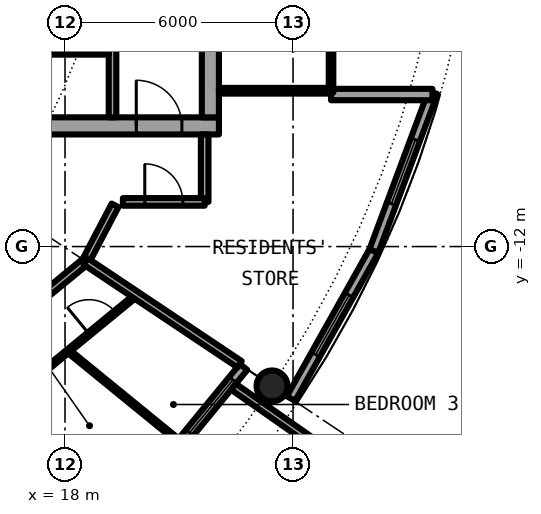
"""IFC4 building model, lengths in metres.
Left out: names, types, materials, properties, quantities, classifications, styles, units other than length and angle.
Written with IfcOpenShell. Run it as: python <this file> out.ifc"""

import sys

from ifc_helpers import new_model, si_unit, direction, frame, frame_2d, origin, origin_2d, place, context, subcontext, project, spatial, rectangle, hollow_circle, extrude, element, fill, save


model = new_model("IFC4")
c1 = context("Model", 3, precision=1e-05, world=origin(), true_north=direction((0.0, 1.0)))
c2 = subcontext(c1, "Body", "Model", "MODEL_VIEW")
j1 = project(units=[si_unit("LENGTHUNIT", "METRE"), si_unit("PLANEANGLEUNIT", "RADIAN")], contexts=[c1])
p1 = place(None, origin())
s1 = spatial("IfcSite", under=j1, at=p1, CompositionType="ELEMENT")
p2 = place(p1, origin())
s2 = spatial("IfcBuilding", under=s1, at=p2, CompositionType="ELEMENT")
p3 = place(p2, frame((0.0, 0.0, 196.3)))
s3 = spatial("IfcBuildingStorey", under=s2, at=p3, CompositionType="ELEMENT", Elevation=196.3)
p4 = place(p3, frame((23.448, -15.667, 0.0), z_axis=(0.0, 0.0, 1.0), x_axis=(1.0, 0.0, 0.0)))
e1 = element("IfcColumn", 1, at=p4, inside=s3, PredefinedType="COLUMN", context=c2, shape_type="SweptSolid", body=[
    extrude(hollow_circle(Radius=0.406, WallThickness=0.03, at=origin_2d()), origin(), (0.0, 0.0, 1.0), 3.05),
])
p5 = place(p3, frame((19.304, -19.304, 0.0), z_axis=(0.0, 0.0, 1.0), x_axis=(0.634382322723, 0.773019449054, 0.0)))
e2 = element("IfcWall", 2, at=p5, inside=s3, PredefinedType="SOLIDWALL", context=c2, shape_type="SweptSolid", body=[
    extrude(rectangle(XDim=5.352, YDim=0.25, at=frame_2d((2.676, 0.0))), origin(), (0.0, 0.0, 1.0), 2.7),
])
p6 = place(p5, frame((0.841, 0.0, 0.0)))
e3 = element("IfcOpeningElement", 3, at=p6, cuts=e2, PredefinedType="OPENING", context=c2, shape_type="SweptSolid", body=[
    extrude(rectangle(XDim=1.0, YDim=2.2, at=frame_2d((0.5, 1.1))), frame((0.0, 0.135, 0.0), z_axis=(0.0, -1.0, 0.0), x_axis=(1.0, 0.0, 0.0)), (0.0, 0.0, 1.0), 0.27),
])
p7 = place(p5, frame((3.111, 0.0, 0.3)))
e4 = element("IfcOpeningElement", 4, at=p7, cuts=e2, PredefinedType="OPENING", context=c2, shape_type="SweptSolid", body=[
    extrude(rectangle(XDim=1.8, YDim=2.1, at=frame_2d((0.9, 1.05))), frame((0.0, 0.135, 0.0), z_axis=(0.0, -1.0, 0.0), x_axis=(1.0, 0.0, 0.0)), (0.0, 0.0, 1.0), 0.27),
])
p8 = place(p3, frame((22.433, -15.688, -0.03), z_axis=(0.0, 0.0, 1.0), x_axis=(0.819373043115, -0.573260687834, 0.0)))
e5 = element("IfcWall", 5, at=p8, inside=s3, PredefinedType="SOLIDWALL", context=c2, shape_type="SweptSolid", body=[
    extrude(rectangle(XDim=2.925, YDim=0.2, at=frame_2d((1.463, 0.0))), origin(), (0.0, 0.0, 1.0), 2.73),
])
p9 = place(p3, frame((23.946, -16.0, 0.0), z_axis=(0.0, 0.0, 1.0), x_axis=(0.489696356642, 0.871893042919, 0.0)))
e6 = element("IfcWall", 6, at=p9, inside=s3, PredefinedType="SOLIDWALL", context=c2, shape_type="SweptSolid", body=[
    extrude(rectangle(XDim=4.454, YDim=0.25, at=frame_2d((2.227, 0.0))), origin(), (0.0, 0.0, 1.0), 2.7),
])
p10 = place(p9, frame((1.327, 0.0, 0.3)))
e7 = element("IfcOpeningElement", 7, at=p10, cuts=e6, PredefinedType="OPENING", context=c2, shape_type="SweptSolid", body=[
    extrude(rectangle(XDim=1.8, YDim=2.1, at=frame_2d((0.9, 1.05))), frame((0.0, 0.135, 0.0), z_axis=(0.0, -1.0, 0.0), x_axis=(1.0, 0.0, 0.0)), (0.0, 0.0, 1.0), 0.27),
])
p11 = place(p3, frame((26.127, -12.117, 0.0), z_axis=(0.0, 0.0, 1.0), x_axis=(0.349247811493, 0.937030397675, 0.0)))
e8 = element("IfcWall", 8, at=p11, inside=s3, PredefinedType="SOLIDWALL", context=c2, shape_type="SweptSolid", body=[
    extrude(rectangle(XDim=4.452, YDim=0.25, at=frame_2d((2.226, 0.0))), origin(), (0.0, 0.0, 1.0), 2.7),
])
p12 = place(p11, frame((1.327, 0.0, 0.3)))
e9 = element("IfcOpeningElement", 9, at=p12, cuts=e8, PredefinedType="OPENING", context=c2, shape_type="SweptSolid", body=[
    extrude(rectangle(XDim=1.8, YDim=2.1, at=frame_2d((0.9, 1.05))), frame((0.0, 0.135, 0.0), z_axis=(0.0, -1.0, 0.0), x_axis=(1.0, 0.0, 0.0)), (0.0, 0.0, 1.0), 0.27),
])
p13 = place(p3, frame((25.0, -8.0, 0.0), z_axis=(0.0, 0.0, 1.0), x_axis=(1.0, 0.0, 0.0)))
e10 = element("IfcWall", 10, at=p13, inside=s3, PredefinedType="SOLIDWALL", context=c2, shape_type="SweptSolid", body=[
    extrude(rectangle(XDim=2.667, YDim=0.3, at=frame_2d((1.333, 0.0))), origin(), (0.0, 0.0, 1.0), 2.7),
])
p14 = place(p3, frame((8.55, -8.825, 0.0), z_axis=(0.0, 0.0, 1.0), x_axis=(1.0, 0.0, 0.0)))
e11 = element("IfcWall", 11, at=p14, inside=s3, PredefinedType="SHEAR", context=c2, shape_type="SweptSolid", body=[
    extrude(rectangle(XDim=13.5, YDim=0.45, at=frame_2d((6.75, 0.0))), origin(), (0.0, 0.0, 1.0), 3.05),
])
p15 = place(p14, frame((11.325, 0.0, 0.0)))
e12 = element("IfcOpeningElement", 12, at=p15, cuts=e11, PredefinedType="OPENING", context=c2, shape_type="SweptSolid", body=[
    extrude(rectangle(XDim=1.2, YDim=2.3, at=frame_2d((0.6, 1.15))), frame((0.0, 0.235, 0.0), z_axis=(0.0, -1.0, 0.0), x_axis=(1.0, 0.0, 0.0)), (0.0, 0.0, 1.0), 0.47),
])
p16 = place(p3, frame((21.825, 8.6, 0.0), z_axis=(0.0, 0.0, 1.0), x_axis=(0.0, -1.0, 0.0)))
e13 = element("IfcWall", 13, at=p16, inside=s3, PredefinedType="SHEAR", context=c2, shape_type="SweptSolid", body=[
    extrude(rectangle(XDim=17.2, YDim=0.45, at=frame_2d((8.6, 0.0))), origin(), (0.0, 0.0, 1.0), 3.05),
])
p17 = place(p16, frame((7.7, 0.0, 0.0)))
e14 = element("IfcOpeningElement", 14, at=p17, cuts=e13, PredefinedType="OPENING", context=c2, shape_type="SweptSolid", body=[
    extrude(rectangle(XDim=1.8, YDim=2.3, at=frame_2d((0.9, 1.15))), frame((0.0, 0.235, 0.0), z_axis=(0.0, -1.0, 0.0), x_axis=(1.0, 0.0, 0.0)), (0.0, 0.0, 1.0), 0.47),
])
p18 = place(p3, frame((19.25, -8.6, 0.0), z_axis=(0.0, 0.0, 1.0), x_axis=(0.0, 1.0, 0.0)))
e15 = element("IfcWall", 15, at=p18, inside=s3, PredefinedType="SOLIDWALL", context=c2, shape_type="SweptSolid", body=[
    extrude(rectangle(XDim=7.025, YDim=0.2, at=frame_2d((3.513, 0.0))), origin(), (0.0, 0.0, 1.0), 2.7),
])
p19 = place(p18, frame((2.35, 0.0, 0.0)))
e16 = element("IfcOpeningElement", 16, at=p19, cuts=e15, PredefinedType="OPENING", context=c2, shape_type="SweptSolid", body=[
    extrude(rectangle(XDim=1.1, YDim=2.3, at=frame_2d((0.55, 1.15))), frame((0.0, 0.11, 0.0), z_axis=(0.0, -1.0, 0.0), x_axis=(1.0, 0.0, 0.0)), (0.0, 0.0, 1.0), 0.22),
])
p20 = place(p3, frame((15.45, -6.875, 0.0), z_axis=(0.0, 0.0, 1.0), x_axis=(1.0, 0.0, 0.0)))
e17 = element("IfcWall", 17, at=p20, inside=s3, PredefinedType="PARTITIONING", context=c2, shape_type="SweptSolid", body=[
    extrude(rectangle(XDim=3.7, YDim=0.15, at=frame_2d((1.85, 0.0))), origin(), (0.0, 0.0, 1.0), 2.7),
])
p21 = place(p20, frame((1.4, 0.0, 0.0)))
e18 = element("IfcOpeningElement", 18, at=p21, cuts=e17, PredefinedType="OPENING", context=c2, shape_type="SweptSolid", body=[
    extrude(rectangle(XDim=0.9, YDim=2.3, at=frame_2d((0.45, 1.15))), frame((0.0, 0.085, 0.0), z_axis=(0.0, -1.0, 0.0), x_axis=(1.0, 0.0, 0.0)), (0.0, 0.0, 1.0), 0.17),
])
p22 = place(p3, frame((22.05, -7.9, 0.0), z_axis=(0.0, 0.0, 1.0), x_axis=(1.0, 0.0, 0.0)))
e19 = element("IfcWall", 19, at=p22, inside=s3, PredefinedType="PARTITIONING", context=c2, shape_type="SweptSolid", body=[
    extrude(rectangle(XDim=2.89, YDim=0.15, at=frame_2d((1.445, 0.0))), origin(), (0.0, 0.0, 1.0), 2.7),
])
p23 = place(p3, frame((25.0, -7.95, 0.0), z_axis=(0.0, 0.0, 1.0), x_axis=(0.0, 1.0, 0.0)))
e20 = element("IfcWall", 20, at=p23, inside=s3, PredefinedType="PARTITIONING", context=c2, shape_type="SweptSolid", body=[
    extrude(rectangle(XDim=15.9, YDim=0.12, at=frame_2d((7.95, 0.0))), origin(), (0.0, 0.0, 1.0), 2.7),
])
p24 = place(p23, frame((0.95, 0.0, 0.1)))
e21 = element("IfcOpeningElement", 21, at=p24, cuts=e20, PredefinedType="OPENING", context=c2, shape_type="SweptSolid", body=[
    extrude(rectangle(XDim=14.0, YDim=2.35, at=frame_2d((7.0, 1.175))), frame((0.0, 0.07, 0.0), z_axis=(0.0, -1.0, 0.0), x_axis=(1.0, 0.0, 0.0)), (0.0, 0.0, 1.0), 0.14),
])
p25 = place(p3, frame((14.508, -17.681, 0.0), z_axis=(0.0, 0.0, 1.0), x_axis=(0.773155647559, 0.634216323227, 0.0)))
e22 = element("IfcWall", 22, at=p25, inside=s3, PredefinedType="PARTITIONING", context=c2, shape_type="SweptSolid", body=[
    extrude(rectangle(XDim=6.939, YDim=0.1, at=frame_2d((3.469, 0.0))), origin(), (0.0, 0.0, 1.0), 2.7),
])
p26 = place(p25, frame((3.019, 0.0, 0.0)))
e23 = element("IfcOpeningElement", 23, at=p26, cuts=e22, PredefinedType="OPENING", context=c2, shape_type="SweptSolid", body=[
    extrude(rectangle(XDim=0.9, YDim=2.3, at=frame_2d((0.45, 1.15))), frame((0.0, 0.06, 0.0), z_axis=(0.0, -1.0, 0.0), x_axis=(1.0, 0.0, 0.0)), (0.0, 0.0, 1.0), 0.12),
])
p27 = place(p25, frame((5.334, 0.0, 0.0)))
e24 = element("IfcOpeningElement", 24, at=p27, cuts=e22, PredefinedType="OPENING", context=c2, shape_type="SweptSolid", body=[
    extrude(rectangle(XDim=0.9, YDim=2.3, at=frame_2d((0.45, 1.15))), frame((0.0, 0.06, 0.0), z_axis=(0.0, -1.0, 0.0), x_axis=(1.0, 0.0, 0.0)), (0.0, 0.0, 1.0), 0.12),
])
p28 = place(p3, frame((18.542, -12.389, 0.0), z_axis=(0.0, 0.0, 1.0), x_axis=(0.465359652486, 0.885121683068, 0.0)))
e25 = element("IfcWall", 25, at=p28, inside=s3, PredefinedType="PARTITIONING", context=c2, shape_type="SweptSolid", body=[
    extrude(rectangle(XDim=1.665, YDim=0.2, at=frame_2d((0.833, 0.0))), origin(), (0.0, 0.0, 1.0), 2.7),
])
p29 = place(p3, frame((21.675, -10.825, 0.0), z_axis=(0.0, 0.0, 1.0), x_axis=(0.0, 1.0, 0.0)))
e26 = element("IfcWall", 26, at=p29, inside=s3, PredefinedType="PARTITIONING", context=c2, shape_type="SweptSolid", body=[
    extrude(rectangle(XDim=1.775, YDim=0.2, at=frame_2d((0.887, 0.0))), origin(), (0.0, 0.0, 1.0), 2.7),
])
p30 = place(p3, frame((8.534, -20.603, 0.0), z_axis=(0.0, 0.0, 1.0), x_axis=(0.772983503654, 0.634426121056, 0.0)))
e27 = element("IfcWall", 27, at=p30, inside=s3, PredefinedType="PARTITIONING", context=c2, shape_type="SweptSolid", body=[
    extrude(rectangle(XDim=12.947, YDim=0.2, at=frame_2d((6.474, 0.0))), origin(), (0.0, 0.0, 1.0), 2.7),
])
p31 = place(p30, frame((7.053, 0.0, 0.0)))
e28 = element("IfcOpeningElement", 28, at=p31, cuts=e27, PredefinedType="OPENING", context=c2, shape_type="SweptSolid", body=[
    extrude(rectangle(XDim=1.0, YDim=2.3, at=frame_2d((0.5, 1.15))), frame((0.0, 0.11, 0.0), z_axis=(0.0, -1.0, 0.0), x_axis=(1.0, 0.0, 0.0)), (0.0, 0.0, 1.0), 0.22),
])
p32 = place(p3, frame((19.523, -10.825, 0.0), z_axis=(0.0, 0.0, 1.0), x_axis=(1.0, 0.0, 0.0)))
e29 = element("IfcWall", 29, at=p32, inside=s3, PredefinedType="PARTITIONING", context=c2, shape_type="SweptSolid", body=[
    extrude(rectangle(XDim=2.152, YDim=0.2, at=frame_2d((1.076, 0.0))), origin(), (0.0, 0.0, 1.0), 2.7),
])
p33 = place(p32, frame((0.576, 0.0, 0.0)))
e30 = element("IfcOpeningElement", 30, at=p33, cuts=e29, PredefinedType="OPENING", context=c2, shape_type="SweptSolid", body=[
    extrude(rectangle(XDim=1.0, YDim=2.3, at=frame_2d((0.5, 1.15))), frame((0.0, 0.11, 0.0), z_axis=(0.0, -1.0, 0.0), x_axis=(1.0, 0.0, 0.0)), (0.0, 0.0, 1.0), 0.22),
])
p34 = place(p3, frame((16.296, -16.213, 0.0), z_axis=(0.0, 0.0, 1.0), x_axis=(0.708999026534, -0.705209458511, 0.0)))
e31 = element("IfcWall", 31, at=p34, inside=s3, PredefinedType="PARTITIONING", context=c2, shape_type="SweptSolid", body=[
    extrude(rectangle(XDim=4.188, YDim=0.1, at=frame_2d((2.094, 0.0))), origin(), (0.0, 0.0, 1.0), 2.7),
])
p35 = place(p3, frame((18.084, -14.745, 0.0), z_axis=(0.0, 0.0, 1.0), x_axis=(0.77495020745, -0.632022290724, 0.0)))
e32 = element("IfcWall", 32, at=p35, inside=s3, PredefinedType="PARTITIONING", context=c2, shape_type="SweptSolid", body=[
    extrude(rectangle(XDim=3.842, YDim=0.1, at=frame_2d((1.921, 0.0))), origin(), (0.0, 0.0, 1.0), 2.7),
])
p36 = place(p3, frame((18.542, -12.389, 0.0), z_axis=(0.0, 0.0, 1.0), x_axis=(0.831387096605, -0.55569370664, 0.0)))
e33 = element("IfcWall", 33, at=p36, inside=s3, PredefinedType="PARTITIONING", context=c2, shape_type="SweptSolid", body=[
    extrude(rectangle(XDim=4.875, YDim=0.2, at=frame_2d((2.438, 0.0))), origin(), (0.0, 0.0, 1.0), 2.7),
])
p37 = place(p7, origin())
e34 = element("IfcWindow", 34, at=p37, inside=s3, PartitioningType="SINGLE_PANEL", PredefinedType="WINDOW", context=c2, shape_type="SweptSolid", body=[
    extrude(rectangle(XDim=1.8, YDim=2.1, at=frame_2d((0.9, 1.05))), frame((0.0, 0.03, 0.0), z_axis=(0.0, -1.0, 0.0), x_axis=(1.0, 0.0, 0.0)), (0.0, 0.0, 1.0), 0.06),
])
fill(e4, e34)
p38 = place(p10, origin())
e35 = element("IfcWindow", 35, at=p38, inside=s3, PartitioningType="SINGLE_PANEL", PredefinedType="WINDOW", context=c2, shape_type="SweptSolid", body=[
    extrude(rectangle(XDim=1.8, YDim=2.1, at=frame_2d((0.9, 1.05))), frame((0.0, 0.03, 0.0), z_axis=(0.0, -1.0, 0.0), x_axis=(1.0, 0.0, 0.0)), (0.0, 0.0, 1.0), 0.06),
])
fill(e7, e35)
p39 = place(p12, origin())
e36 = element("IfcWindow", 36, at=p39, inside=s3, PartitioningType="SINGLE_PANEL", PredefinedType="WINDOW", context=c2, shape_type="SweptSolid", body=[
    extrude(rectangle(XDim=1.8, YDim=2.1, at=frame_2d((0.9, 1.05))), frame((0.0, 0.03, 0.0), z_axis=(0.0, -1.0, 0.0), x_axis=(1.0, 0.0, 0.0)), (0.0, 0.0, 1.0), 0.06),
])
fill(e9, e36)
p40 = place(p21, origin())
e37 = element("IfcDoor", 37, at=p40, inside=s3, OperationType="SINGLE_SWING_LEFT", PredefinedType="DOOR", context=c2, shape_type="SweptSolid", body=[
    extrude(rectangle(XDim=0.9, YDim=2.3, at=frame_2d((0.45, 1.15))), frame((0.0, 0.025, 0.0), z_axis=(0.0, -1.0, 0.0), x_axis=(1.0, 0.0, 0.0)), (0.0, 0.0, 1.0), 0.05),
])
fill(e18, e37)
p41 = place(p15, origin())
e38 = element("IfcDoor", 38, at=p41, inside=s3, OperationType="SINGLE_SWING_LEFT", PredefinedType="DOOR", context=c2, shape_type="SweptSolid", body=[
    extrude(rectangle(XDim=1.2, YDim=2.3, at=frame_2d((0.6, 1.15))), frame((0.0, 0.025, 0.0), z_axis=(0.0, -1.0, 0.0), x_axis=(1.0, 0.0, 0.0)), (0.0, 0.0, 1.0), 0.05),
])
fill(e12, e38)
p42 = place(p24, origin())
e39 = element("IfcWindow", 39, at=p42, inside=s3, PartitioningType="SINGLE_PANEL", PredefinedType="WINDOW", context=c2, shape_type="SweptSolid", body=[
    extrude(rectangle(XDim=14.0, YDim=2.35, at=frame_2d((7.0, 1.175))), frame((0.0, 0.03, 0.0), z_axis=(0.0, -1.0, 0.0), x_axis=(1.0, 0.0, 0.0)), (0.0, 0.0, 1.0), 0.06),
])
fill(e21, e39)
p43 = place(p27, origin())
e40 = element("IfcDoor", 40, at=p43, inside=s3, OperationType="SINGLE_SWING_RIGHT", PredefinedType="DOOR", context=c2, shape_type="SweptSolid", body=[
    extrude(rectangle(XDim=0.9, YDim=2.3, at=frame_2d((0.45, 1.15))), frame((0.0, 0.025, 0.0), z_axis=(0.0, -1.0, 0.0), x_axis=(1.0, 0.0, 0.0)), (0.0, 0.0, 1.0), 0.05),
])
fill(e24, e40)
p44 = place(p33, origin())
e41 = element("IfcDoor", 41, at=p44, inside=s3, OperationType="SINGLE_SWING_LEFT", PredefinedType="DOOR", context=c2, shape_type="SweptSolid", body=[
    extrude(rectangle(XDim=1.0, YDim=2.3, at=frame_2d((0.5, 1.15))), frame((0.0, 0.025, 0.0), z_axis=(0.0, -1.0, 0.0), x_axis=(1.0, 0.0, 0.0)), (0.0, 0.0, 1.0), 0.05),
])
fill(e30, e41)
save(model, sys.argv[1])
